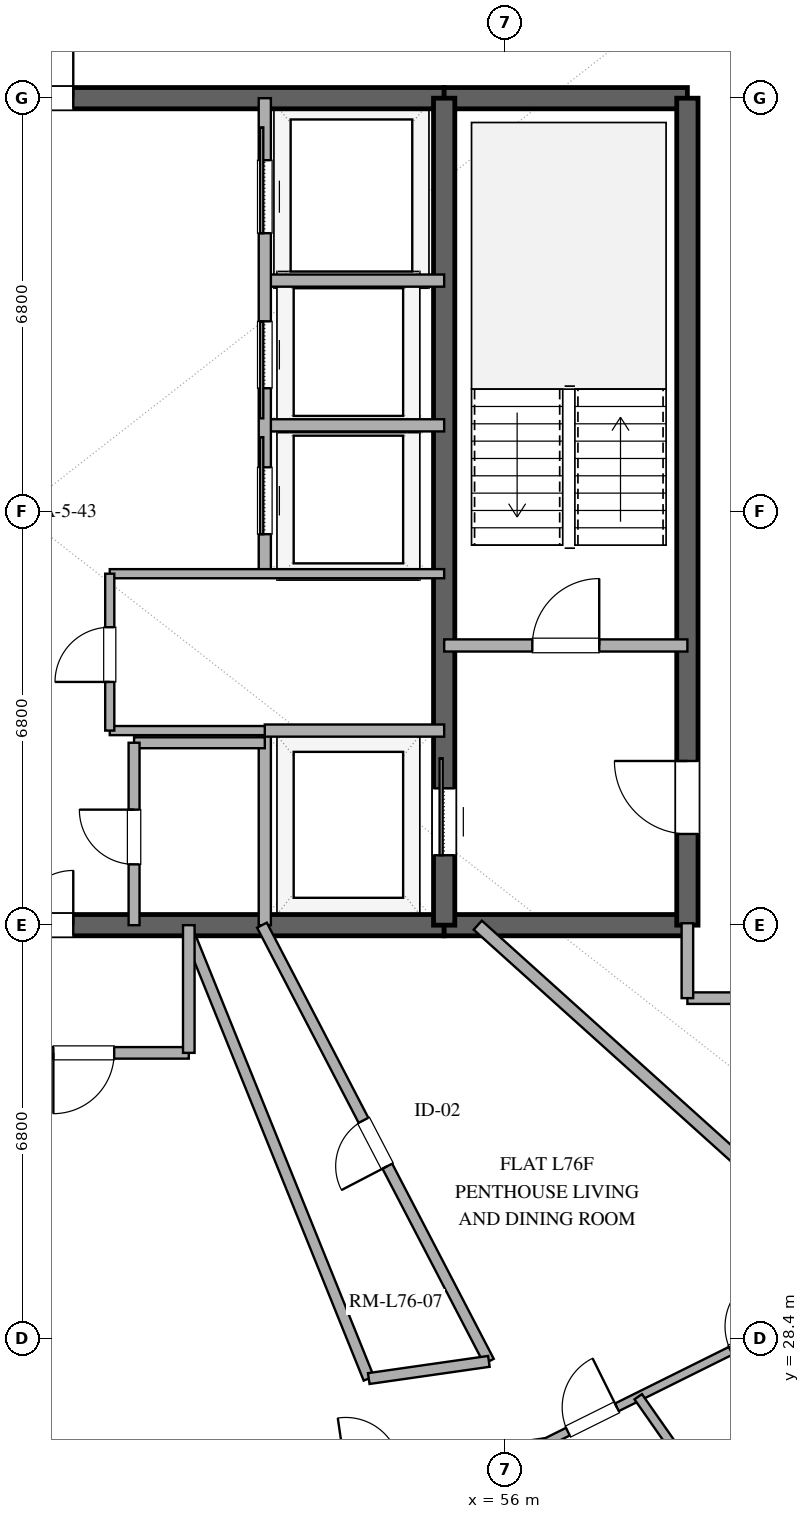
"""IFC4 building model, lengths in metres.
Left out: names, types, materials, properties, quantities, classifications, styles, units other than length and angle.
Written with IfcOpenShell. Run it as: python <this file> out.ifc"""

import sys

from ifc_helpers import new_model, si_unit, direction, frame, frame_2d, origin, place, context, subcontext, project, spatial, rectangle, extrude, element, fill, save


model = new_model("IFC4")
c1 = context("Model", 3, precision=1e-05, world=origin(), true_north=direction((0.0, 1.0)))
c2 = subcontext(c1, "Body", "Model", "MODEL_VIEW")
j1 = project(units=[si_unit("LENGTHUNIT", "METRE"), si_unit("PLANEANGLEUNIT", "RADIAN")], contexts=[c1])
p1 = place(None, origin())
s1 = spatial("IfcSite", under=j1, at=p1, CompositionType="ELEMENT")
p2 = place(p1, origin())
s2 = spatial("IfcBuilding", under=s1, at=p2, CompositionType="ELEMENT")
p3 = place(p2, frame((0.0, 0.0, 294.6)))
s3 = spatial("IfcBuildingStorey", under=s2, at=p3, CompositionType="ELEMENT", Elevation=294.6)
p4 = place(p3, frame((41.0, 35.2, 0.0), z_axis=(0.0, 0.0, 1.0), x_axis=(1.0, 0.0, 0.0)))
e1 = element("IfcWall", 1, at=p4, inside=s3, PredefinedType="SHEAR", context=c2, shape_type="SweptSolid", body=[
    extrude(rectangle(XDim=14.0, YDim=0.35, at=frame_2d((7.0, 0.0))), origin(), (0.0, 0.0, 1.0), 3.37),
])
p5 = place(p4, frame((6.1, 0.0, 0.0)))
e2 = element("IfcOpeningElement", 2, at=p5, cuts=e1, PredefinedType="OPENING", context=c2, shape_type="SweptSolid", body=[
    extrude(rectangle(XDim=1.8, YDim=2.25, at=frame_2d((0.9, 1.125))), frame((0.0, 0.185, 0.0), z_axis=(0.0, -1.0, 0.0), x_axis=(1.0, 0.0, 0.0)), (0.0, 0.0, 1.0), 0.37),
])
p6 = place(p3, frame((55.0, 35.2, 0.0), z_axis=(0.0, 0.0, 1.0), x_axis=(1.0, 0.0, 0.0)))
e3 = element("IfcWall", 3, at=p6, inside=s3, PredefinedType="SHEAR", context=c2, shape_type="SweptSolid", body=[
    extrude(rectangle(XDim=4.0, YDim=0.35, at=frame_2d((2.0, 0.0))), origin(), (0.0, 0.0, 1.0), 3.37),
])
p7 = place(p3, frame((41.0, 48.8, 0.0), z_axis=(0.0, 0.0, 1.0), x_axis=(1.0, 0.0, 0.0)))
e4 = element("IfcWall", 4, at=p7, inside=s3, PredefinedType="SHEAR", context=c2, shape_type="SweptSolid", body=[
    extrude(rectangle(XDim=14.0, YDim=0.35, at=frame_2d((7.0, 0.0))), origin(), (0.0, 0.0, 1.0), 3.37),
])
p8 = place(p7, frame((6.1, 0.0, 0.0)))
e5 = element("IfcOpeningElement", 5, at=p8, cuts=e4, PredefinedType="OPENING", context=c2, shape_type="SweptSolid", body=[
    extrude(rectangle(XDim=1.8, YDim=2.25, at=frame_2d((0.9, 1.125))), frame((0.0, 0.185, 0.0), z_axis=(0.0, -1.0, 0.0), x_axis=(1.0, 0.0, 0.0)), (0.0, 0.0, 1.0), 0.37),
])
p9 = place(p3, frame((55.0, 48.8, 0.0), z_axis=(0.0, 0.0, 1.0), x_axis=(1.0, 0.0, 0.0)))
e6 = element("IfcWall", 6, at=p9, inside=s3, PredefinedType="SHEAR", context=c2, shape_type="SweptSolid", body=[
    extrude(rectangle(XDim=4.0, YDim=0.35, at=frame_2d((2.0, 0.0))), origin(), (0.0, 0.0, 1.0), 3.37),
])
p10 = place(p3, frame((59.0, 35.2, 0.0), z_axis=(0.0, 0.0, 1.0), x_axis=(0.0, 1.0, 0.0)))
e7 = element("IfcWall", 7, at=p10, inside=s3, PredefinedType="SHEAR", context=c2, shape_type="SweptSolid", body=[
    extrude(rectangle(XDim=13.6, YDim=0.35, at=frame_2d((6.8, 0.0))), origin(), (0.0, 0.0, 1.0), 3.37),
])
p11 = place(p10, frame((1.5, 0.0, 0.0)))
e8 = element("IfcOpeningElement", 8, at=p11, cuts=e7, PredefinedType="OPENING", context=c2, shape_type="SweptSolid", body=[
    extrude(rectangle(XDim=1.2, YDim=2.15, at=frame_2d((0.6, 1.075))), frame((0.0, 0.185, 0.0), z_axis=(0.0, -1.0, 0.0), x_axis=(1.0, 0.0, 0.0)), (0.0, 0.0, 1.0), 0.37),
])
p12 = place(p3, frame((55.0, 35.2, 0.0), z_axis=(0.0, 0.0, 1.0), x_axis=(0.0, 1.0, 0.0)))
e9 = element("IfcWall", 9, at=p12, inside=s3, PredefinedType="SHEAR", context=c2, shape_type="SweptSolid", body=[
    extrude(rectangle(XDim=13.6, YDim=0.35, at=frame_2d((6.8, 0.0))), origin(), (0.0, 0.0, 1.0), 3.37),
])
p13 = place(p12, frame((1.15, 0.0, 0.0)))
e10 = element("IfcOpeningElement", 10, at=p13, cuts=e9, PredefinedType="OPENING", context=c2, shape_type="SweptSolid", body=[
    extrude(rectangle(XDim=1.1, YDim=2.2, at=frame_2d((0.55, 1.1))), frame((0.0, 0.185, 0.0), z_axis=(0.0, -1.0, 0.0), x_axis=(1.0, 0.0, 0.0)), (0.0, 0.0, 1.0), 0.37),
])
p14 = place(p3, frame((55.0, 39.8, 0.0), z_axis=(0.0, 0.0, 1.0), x_axis=(1.0, 0.0, 0.0)))
e11 = element("IfcWall", 11, at=p14, inside=s3, PredefinedType="SOLIDWALL", context=c2, shape_type="SweptSolid", body=[
    extrude(rectangle(XDim=4.0, YDim=0.2, at=frame_2d((2.0, 0.0))), origin(), (0.0, 0.0, 1.0), 2.73),
])
p15 = place(p14, frame((1.45, 0.0, 0.0)))
e12 = element("IfcOpeningElement", 12, at=p15, cuts=e11, PredefinedType="OPENING", context=c2, shape_type="SweptSolid", body=[
    extrude(rectangle(XDim=1.1, YDim=2.15, at=frame_2d((0.55, 1.075))), frame((0.0, 0.11, 0.0), z_axis=(0.0, -1.0, 0.0), x_axis=(1.0, 0.0, 0.0)), (0.0, 0.0, 1.0), 0.22),
])
p16 = place(p3, frame((52.05, 35.2, 0.0), z_axis=(0.0, 0.0, 1.0), x_axis=(0.0, 1.0, 0.0)))
e13 = element("IfcWall", 13, at=p16, inside=s3, PredefinedType="SOLIDWALL", context=c2, shape_type="SweptSolid", body=[
    extrude(rectangle(XDim=3.2, YDim=0.2, at=frame_2d((1.6, 0.0))), origin(), (0.0, 0.0, 1.0), 2.73),
])
for number, where, z_axis, x_axis in (
    (14, (52.05, 38.4, 0.0), (0.0, 0.0, 1.0), (1.0, 0.0, 0.0)),
    (15, (52.05, 43.42, 0.0), (0.0, 0.0, 1.0), (1.0, 0.0, 0.0)),
    (16, (52.05, 45.8, 0.0), (0.0, 0.0, 1.0), (1.0, 0.0, 0.0)),
):
    element("IfcWall", number, at=place(p3, frame(where, z_axis=z_axis, x_axis=x_axis)), inside=s3, PredefinedType="SOLIDWALL", context=c2, shape_type="SweptSolid", body=[
        extrude(rectangle(XDim=2.95, YDim=0.2, at=frame_2d((1.475, 0.0))), origin(), (0.0, 0.0, 1.0), 2.73),
    ])
p17 = place(p3, frame((52.05, 40.98, 0.0), z_axis=(0.0, 0.0, 1.0), x_axis=(0.0, 1.0, 0.0)))
e17 = element("IfcWall", 17, at=p17, inside=s3, PredefinedType="SOLIDWALL", context=c2, shape_type="SweptSolid", body=[
    extrude(rectangle(XDim=7.82, YDim=0.2, at=frame_2d((3.91, 0.0))), origin(), (0.0, 0.0, 1.0), 2.73),
])
p18 = place(p17, frame((0.65, 0.0, 0.0)))
e18 = element("IfcOpeningElement", 18, at=p18, cuts=e17, PredefinedType="OPENING", context=c2, shape_type="SweptSolid", body=[
    extrude(rectangle(XDim=1.1, YDim=2.2, at=frame_2d((0.55, 1.1))), frame((0.0, 0.11, 0.0), z_axis=(0.0, -1.0, 0.0), x_axis=(1.0, 0.0, 0.0)), (0.0, 0.0, 1.0), 0.22),
])
p19 = place(p17, frame((3.05, 0.0, 0.0)))
e19 = element("IfcOpeningElement", 19, at=p19, cuts=e17, PredefinedType="OPENING", context=c2, shape_type="SweptSolid", body=[
    extrude(rectangle(XDim=1.1, YDim=2.2, at=frame_2d((0.55, 1.1))), frame((0.0, 0.11, 0.0), z_axis=(0.0, -1.0, 0.0), x_axis=(1.0, 0.0, 0.0)), (0.0, 0.0, 1.0), 0.22),
])
p20 = place(p17, frame((5.6, 0.0, 0.0)))
e20 = element("IfcOpeningElement", 20, at=p20, cuts=e17, PredefinedType="OPENING", context=c2, shape_type="SweptSolid", body=[
    extrude(rectangle(XDim=1.2, YDim=2.2, at=frame_2d((0.6, 1.1))), frame((0.0, 0.11, 0.0), z_axis=(0.0, -1.0, 0.0), x_axis=(1.0, 0.0, 0.0)), (0.0, 0.0, 1.0), 0.22),
])
p21 = place(p3, frame((49.5, 40.98, 0.0), z_axis=(0.0, 0.0, 1.0), x_axis=(1.0, 0.0, 0.0)))
e21 = element("IfcWall", 21, at=p21, inside=s3, PredefinedType="PARTITIONING", context=c2, shape_type="SweptSolid", body=[
    extrude(rectangle(XDim=5.5, YDim=0.15, at=frame_2d((2.75, 0.0))), origin(), (0.0, 0.0, 1.0), 2.73),
])
p22 = place(p3, frame((49.5, 38.4, 0.0), z_axis=(0.0, 0.0, 1.0), x_axis=(1.0, 0.0, 0.0)))
e22 = element("IfcWall", 22, at=p22, inside=s3, PredefinedType="PARTITIONING", context=c2, shape_type="SweptSolid", body=[
    extrude(rectangle(XDim=2.55, YDim=0.15, at=frame_2d((1.275, 0.0))), origin(), (0.0, 0.0, 1.0), 2.73),
])
p23 = place(p3, frame((49.5, 38.4, 0.0), z_axis=(0.0, 0.0, 1.0), x_axis=(0.0, 1.0, 0.0)))
e23 = element("IfcWall", 23, at=p23, inside=s3, PredefinedType="PARTITIONING", context=c2, shape_type="SweptSolid", body=[
    extrude(rectangle(XDim=2.58, YDim=0.15, at=frame_2d((1.29, 0.0))), origin(), (0.0, 0.0, 1.0), 2.73),
])
p24 = place(p23, frame((0.8, 0.0, 0.0)))
e24 = element("IfcOpeningElement", 24, at=p24, cuts=e23, PredefinedType="OPENING", context=c2, shape_type="SweptSolid", body=[
    extrude(rectangle(XDim=0.9, YDim=2.15, at=frame_2d((0.45, 1.075))), frame((0.0, 0.085, 0.0), z_axis=(0.0, -1.0, 0.0), x_axis=(1.0, 0.0, 0.0)), (0.0, 0.0, 1.0), 0.17),
])
p25 = place(p3, frame((49.9, 38.2, 0.0), z_axis=(0.0, 0.0, 1.0), x_axis=(1.0, 0.0, 0.0)))
e25 = element("IfcWall", 25, at=p25, inside=s3, PredefinedType="PLUMBINGWALL", context=c2, shape_type="SweptSolid", body=[
    extrude(rectangle(XDim=2.15, YDim=0.18, at=frame_2d((1.075, 0.0))), origin(), (0.0, 0.0, 1.0), 2.73),
])
p26 = place(p3, frame((49.9, 35.2, 0.0), z_axis=(0.0, 0.0, 1.0), x_axis=(0.0, 1.0, 0.0)))
e26 = element("IfcWall", 26, at=p26, inside=s3, PredefinedType="PLUMBINGWALL", context=c2, shape_type="SweptSolid", body=[
    extrude(rectangle(XDim=3.0, YDim=0.18, at=frame_2d((1.5, 0.0))), origin(), (0.0, 0.0, 1.0), 2.73),
])
p27 = place(p26, frame((1.0, 0.0, 0.0)))
e27 = element("IfcOpeningElement", 27, at=p27, cuts=e26, PredefinedType="OPENING", context=c2, shape_type="SweptSolid", body=[
    extrude(rectangle(XDim=0.9, YDim=2.1, at=frame_2d((0.45, 1.05))), frame((0.0, 0.1, 0.0), z_axis=(0.0, -1.0, 0.0), x_axis=(1.0, 0.0, 0.0)), (0.0, 0.0, 1.0), 0.2),
])
p28 = place(p3, frame((64.656, 27.003, 0.0), z_axis=(0.0, 0.0, 1.0), x_axis=(-0.743146474593, 0.669128774826, 0.0)))
e28 = element("IfcWall", 28, at=p28, inside=s3, PredefinedType="PARTITIONING", context=c2, shape_type="SweptSolid", body=[
    extrude(rectangle(XDim=12.25, YDim=0.2, at=frame_2d((6.125, 0.0))), origin(), (0.0, 0.0, 1.0), 2.73),
])
p29 = place(p3, frame((55.736, 28.027, 0.0), z_axis=(0.0, 0.0, 1.0), x_axis=(-0.461598928477, 0.88708873808, 0.0)))
e29 = element("IfcWall", 29, at=p29, inside=s3, PredefinedType="PLUMBINGWALL", context=c2, shape_type="SweptSolid", body=[
    extrude(rectangle(XDim=8.086, YDim=0.18, at=frame_2d((4.043, 0.0))), origin(), (0.0, 0.0, 1.0), 2.73),
])
p30 = place(p29, frame((3.618, 0.0, 0.0)))
e30 = element("IfcOpeningElement", 30, at=p30, cuts=e29, PredefinedType="OPENING", context=c2, shape_type="SweptSolid", body=[
    extrude(rectangle(XDim=0.85, YDim=2.1, at=frame_2d((0.425, 1.05))), frame((0.0, 0.1, 0.0), z_axis=(0.0, -1.0, 0.0), x_axis=(1.0, 0.0, 0.0)), (0.0, 0.0, 1.0), 0.2),
])
p31 = place(p3, frame((50.8, 35.07, 0.0), z_axis=(0.0, 0.0, 1.0), x_axis=(0.374600990238, -0.927186118378, 0.0)))
e31 = element("IfcWall", 31, at=p31, inside=s3, PredefinedType="PLUMBINGWALL", context=c2, shape_type="SweptSolid", body=[
    extrude(rectangle(XDim=7.901, YDim=0.18, at=frame_2d((3.95, 0.0))), origin(), (0.0, 0.0, 1.0), 2.73),
])
p32 = place(p3, frame((56.655, 26.682, 0.0), z_axis=(0.0, 0.0, 1.0), x_axis=(0.895585218268, 0.444890005304, 0.0)))
e32 = element("IfcWall", 32, at=p32, inside=s3, PredefinedType="PARTITIONING", context=c2, shape_type="SweptSolid", body=[
    extrude(rectangle(XDim=6.014, YDim=0.14, at=frame_2d((3.007, 0.0))), origin(), (0.0, 0.0, 1.0), 2.73),
])
p33 = place(p32, frame((3.415, 0.0, 0.0)))
e33 = element("IfcOpeningElement", 33, at=p33, cuts=e32, PredefinedType="OPENING", context=c2, shape_type="SweptSolid", body=[
    extrude(rectangle(XDim=0.9, YDim=2.1, at=frame_2d((0.45, 1.05))), frame((0.0, 0.08, 0.0), z_axis=(0.0, -1.0, 0.0), x_axis=(1.0, 0.0, 0.0)), (0.0, 0.0, 1.0), 0.16),
])
p34 = place(p32, frame((0.424, 0.0, 0.0)))
e34 = element("IfcOpeningElement", 34, at=p34, cuts=e32, PredefinedType="OPENING", context=c2, shape_type="SweptSolid", body=[
    extrude(rectangle(XDim=0.9, YDim=2.1, at=frame_2d((0.45, 1.05))), frame((0.0, 0.08, 0.0), z_axis=(0.0, -1.0, 0.0), x_axis=(1.0, 0.0, 0.0)), (0.0, 0.0, 1.0), 0.16),
])
p35 = place(p3, frame((50.8, 33.1, 0.0), z_axis=(0.0, 0.0, 1.0), x_axis=(-1.0, 0.0, 0.0)))
e35 = element("IfcWall", 35, at=p35, inside=s3, PredefinedType="PARTITIONING", context=c2, shape_type="SweptSolid", body=[
    extrude(rectangle(XDim=5.6, YDim=0.19, at=frame_2d((2.8, 0.0))), origin(), (0.0, 0.0, 1.0), 2.73),
])
p36 = place(p35, frame((1.227, 0.0, 0.0)))
e36 = element("IfcOpeningElement", 36, at=p36, cuts=e35, PredefinedType="OPENING", context=c2, shape_type="SweptSolid", body=[
    extrude(rectangle(XDim=1.0, YDim=2.2, at=frame_2d((0.5, 1.1))), frame((0.0, 0.105, 0.0), z_axis=(0.0, -1.0, 0.0), x_axis=(1.0, 0.0, 0.0)), (0.0, 0.0, 1.0), 0.21),
])
p37 = place(p35, frame((3.995, 0.0, 0.0)))
e37 = element("IfcOpeningElement", 37, at=p37, cuts=e35, PredefinedType="OPENING", context=c2, shape_type="SweptSolid", body=[
    extrude(rectangle(XDim=1.0, YDim=2.2, at=frame_2d((0.5, 1.1))), frame((0.0, 0.105, 0.0), z_axis=(0.0, -1.0, 0.0), x_axis=(1.0, 0.0, 0.0)), (0.0, 0.0, 1.0), 0.21),
])
p38 = place(p3, frame((52.141, 26.024, 0.0), z_axis=(0.0, 0.0, 1.0), x_axis=(0.989534254842, 0.144298158322, 0.0)))
e38 = element("IfcWall", 38, at=p38, inside=s3, PredefinedType="PLUMBINGWALL", context=c2, shape_type="SweptSolid", body=[
    extrude(rectangle(XDim=4.562, YDim=0.16, at=frame_2d((2.281, 0.0))), origin(), (0.0, 0.0, 1.0), 2.73),
])
p39 = place(p38, frame((1.252, 0.0, 0.0)))
e39 = element("IfcOpeningElement", 39, at=p39, cuts=e38, PredefinedType="OPENING", context=c2, shape_type="SweptSolid", body=[
    extrude(rectangle(XDim=0.9, YDim=2.1, at=frame_2d((0.45, 1.05))), frame((0.0, 0.09, 0.0), z_axis=(0.0, -1.0, 0.0), x_axis=(1.0, 0.0, 0.0)), (0.0, 0.0, 1.0), 0.18),
])
p40 = place(p3, frame((58.191, 27.445, 0.0), z_axis=(0.0, 0.0, 1.0), x_axis=(0.573559302344, -0.819164041383, 0.0)))
e40 = element("IfcWall", 40, at=p40, inside=s3, PredefinedType="PARTITIONING", context=c2, shape_type="SweptSolid", body=[
    extrude(rectangle(XDim=3.38, YDim=0.15, at=frame_2d((1.69, 0.0))), origin(), (0.0, 0.0, 1.0), 2.73),
])
p41 = place(p3, frame((61.2, 34.0, 0.0), z_axis=(0.0, 0.0, 1.0), x_axis=(-1.0, 0.0, 0.0)))
e41 = element("IfcWall", 41, at=p41, inside=s3, PredefinedType="PARTITIONING", context=c2, shape_type="SweptSolid", body=[
    extrude(rectangle(XDim=2.2, YDim=0.19, at=frame_2d((1.1, 0.0))), origin(), (0.0, 0.0, 1.0), 2.73),
])
p42 = place(p3, frame((50.8, 35.2, 0.0), z_axis=(0.0, 0.0, 1.0), x_axis=(0.0, -1.0, 0.0)))
e42 = element("IfcWall", 42, at=p42, inside=s3, PredefinedType="PARTITIONING", context=c2, shape_type="SweptSolid", body=[
    extrude(rectangle(XDim=2.1, YDim=0.19, at=frame_2d((1.05, 0.0))), origin(), (0.0, 0.0, 1.0), 2.73),
])
p43 = place(p3, frame((53.76, 27.744, 0.0), z_axis=(0.0, 0.0, 1.0), x_axis=(0.989917666011, 0.141643970992, 0.0)))
e43 = element("IfcWall", 43, at=p43, inside=s3, PredefinedType="PLUMBINGWALL", context=c2, shape_type="SweptSolid", body=[
    extrude(rectangle(XDim=1.996, YDim=0.18, at=frame_2d((0.998, 0.0))), origin(), (0.0, 0.0, 1.0), 2.73),
])
p44 = place(p3, frame((59.0, 34.0, 0.0), z_axis=(0.0, 0.0, 1.0), x_axis=(0.0, 1.0, 0.0)))
e44 = element("IfcWall", 44, at=p44, inside=s3, PredefinedType="PARTITIONING", context=c2, shape_type="SweptSolid", body=[
    extrude(rectangle(XDim=1.232, YDim=0.19, at=frame_2d((0.616, 0.0))), origin(), (0.0, 0.0, 1.0), 2.73),
])
p45 = place(p13, origin())
e45 = element("IfcDoor", 45, at=p45, inside=s3, OperationType="SLIDING_TO_RIGHT", PredefinedType="DOOR", context=c2, shape_type="SweptSolid", body=[
    extrude(rectangle(XDim=1.1, YDim=2.2, at=frame_2d((0.55, 1.1))), frame((0.0, 0.025, 0.0), z_axis=(0.0, -1.0, 0.0), x_axis=(1.0, 0.0, 0.0)), (0.0, 0.0, 1.0), 0.05),
])
fill(e10, e45)
p46 = place(p11, origin())
e46 = element("IfcDoor", 46, at=p46, inside=s3, OperationType="SINGLE_SWING_RIGHT", PredefinedType="DOOR", context=c2, shape_type="SweptSolid", body=[
    extrude(rectangle(XDim=1.2, YDim=2.15, at=frame_2d((0.6, 1.075))), frame((0.0, 0.025, 0.0), z_axis=(0.0, -1.0, 0.0), x_axis=(1.0, 0.0, 0.0)), (0.0, 0.0, 1.0), 0.05),
])
fill(e8, e46)
p47 = place(p5, origin())
e47 = element("IfcDoor", 47, at=p47, inside=s3, OperationType="DOUBLE_DOOR_SINGLE_SWING", PredefinedType="DOOR", context=c2, shape_type="SweptSolid", body=[
    extrude(rectangle(XDim=1.8, YDim=2.25, at=frame_2d((0.9, 1.125))), frame((0.0, 0.025, 0.0), z_axis=(0.0, -1.0, 0.0), x_axis=(1.0, 0.0, 0.0)), (0.0, 0.0, 1.0), 0.05),
])
fill(e2, e47)
p48 = place(p8, origin())
e48 = element("IfcDoor", 48, at=p48, inside=s3, OperationType="DOUBLE_DOOR_SINGLE_SWING", PredefinedType="DOOR", context=c2, shape_type="SweptSolid", body=[
    extrude(rectangle(XDim=1.8, YDim=2.25, at=frame_2d((0.9, 1.125))), frame((0.0, 0.025, 0.0), z_axis=(0.0, -1.0, 0.0), x_axis=(1.0, 0.0, 0.0)), (0.0, 0.0, 1.0), 0.05),
])
fill(e5, e48)
p49 = place(p15, origin())
e49 = element("IfcDoor", 49, at=p49, inside=s3, OperationType="SINGLE_SWING_RIGHT", PredefinedType="DOOR", context=c2, shape_type="SweptSolid", body=[
    extrude(rectangle(XDim=1.1, YDim=2.15, at=frame_2d((0.55, 1.075))), frame((0.0, 0.025, 0.0), z_axis=(0.0, -1.0, 0.0), x_axis=(1.0, 0.0, 0.0)), (0.0, 0.0, 1.0), 0.05),
])
fill(e12, e49)
p50 = place(p18, origin())
e50 = element("IfcDoor", 50, at=p50, inside=s3, OperationType="SLIDING_TO_RIGHT", PredefinedType="DOOR", context=c2, shape_type="SweptSolid", body=[
    extrude(rectangle(XDim=1.1, YDim=2.2, at=frame_2d((0.55, 1.1))), frame((0.0, 0.025, 0.0), z_axis=(0.0, -1.0, 0.0), x_axis=(1.0, 0.0, 0.0)), (0.0, 0.0, 1.0), 0.05),
])
fill(e18, e50)
p51 = place(p19, origin())
e51 = element("IfcDoor", 51, at=p51, inside=s3, OperationType="SLIDING_TO_LEFT", PredefinedType="DOOR", context=c2, shape_type="SweptSolid", body=[
    extrude(rectangle(XDim=1.1, YDim=2.2, at=frame_2d((0.55, 1.1))), frame((0.0, 0.025, 0.0), z_axis=(0.0, -1.0, 0.0), x_axis=(1.0, 0.0, 0.0)), (0.0, 0.0, 1.0), 0.05),
])
fill(e19, e51)
p52 = place(p20, origin())
e52 = element("IfcDoor", 52, at=p52, inside=s3, OperationType="SLIDING_TO_RIGHT", PredefinedType="DOOR", context=c2, shape_type="SweptSolid", body=[
    extrude(rectangle(XDim=1.2, YDim=2.2, at=frame_2d((0.6, 1.1))), frame((0.0, 0.025, 0.0), z_axis=(0.0, -1.0, 0.0), x_axis=(1.0, 0.0, 0.0)), (0.0, 0.0, 1.0), 0.05),
])
fill(e20, e52)
p53 = place(p24, origin())
e53 = element("IfcDoor", 53, at=p53, inside=s3, OperationType="SINGLE_SWING_LEFT", PredefinedType="DOOR", context=c2, shape_type="SweptSolid", body=[
    extrude(rectangle(XDim=0.9, YDim=2.15, at=frame_2d((0.45, 1.075))), frame((0.0, 0.025, 0.0), z_axis=(0.0, -1.0, 0.0), x_axis=(1.0, 0.0, 0.0)), (0.0, 0.0, 1.0), 0.05),
])
fill(e24, e53)
p54 = place(p27, origin())
e54 = element("IfcDoor", 54, at=p54, inside=s3, OperationType="SINGLE_SWING_RIGHT", PredefinedType="DOOR", context=c2, shape_type="SweptSolid", body=[
    extrude(rectangle(XDim=0.9, YDim=2.1, at=frame_2d((0.45, 1.05))), frame((0.0, 0.025, 0.0), z_axis=(0.0, -1.0, 0.0), x_axis=(1.0, 0.0, 0.0)), (0.0, 0.0, 1.0), 0.05),
])
fill(e27, e54)
p55 = place(p30, origin())
e55 = element("IfcDoor", 55, at=p55, inside=s3, OperationType="SINGLE_SWING_LEFT", PredefinedType="DOOR", context=c2, shape_type="SweptSolid", body=[
    extrude(rectangle(XDim=0.85, YDim=2.1, at=frame_2d((0.425, 1.05))), frame((0.0, 0.025, 0.0), z_axis=(0.0, -1.0, 0.0), x_axis=(1.0, 0.0, 0.0)), (0.0, 0.0, 1.0), 0.05),
])
fill(e30, e55)
p56 = place(p34, origin())
e56 = element("IfcDoor", 56, at=p56, inside=s3, OperationType="SINGLE_SWING_RIGHT", PredefinedType="DOOR", context=c2, shape_type="SweptSolid", body=[
    extrude(rectangle(XDim=0.9, YDim=2.1, at=frame_2d((0.45, 1.05))), frame((0.0, 0.025, 0.0), z_axis=(0.0, -1.0, 0.0), x_axis=(1.0, 0.0, 0.0)), (0.0, 0.0, 1.0), 0.05),
])
fill(e34, e56)
p57 = place(p36, origin())
e57 = element("IfcDoor", 57, at=p57, inside=s3, OperationType="SINGLE_SWING_RIGHT", PredefinedType="DOOR", context=c2, shape_type="SweptSolid", body=[
    extrude(rectangle(XDim=1.0, YDim=2.2, at=frame_2d((0.5, 1.1))), frame((0.0, 0.025, 0.0), z_axis=(0.0, -1.0, 0.0), x_axis=(1.0, 0.0, 0.0)), (0.0, 0.0, 1.0), 0.05),
])
fill(e36, e57)
save(model, sys.argv[1])
